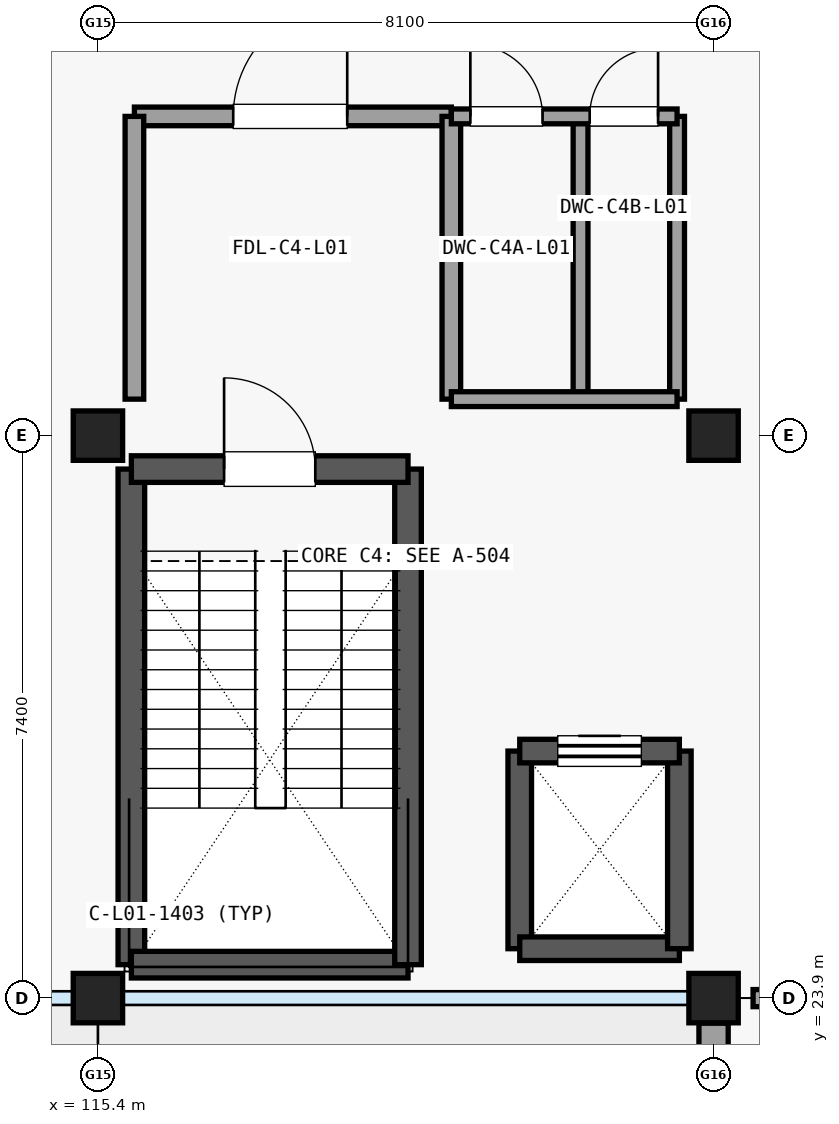
"""IFC4 building model, lengths in metres.
Left out: names, types, materials, properties, quantities, classifications, styles, units other than length and angle.
Written with IfcOpenShell. Run it as: python <this file> out.ifc"""

import sys

from ifc_helpers import new_model, si_unit, direction, frame, frame_2d, origin, origin_2d, place, context, subcontext, project, spatial, rectangle, extrude, element, fill, save


model = new_model("IFC4")
c1 = context("Model", 3, precision=1e-05, world=origin(), true_north=direction((0.0, 1.0)))
c2 = subcontext(c1, "Body", "Model", "MODEL_VIEW")
j1 = project(units=[si_unit("LENGTHUNIT", "METRE"), si_unit("PLANEANGLEUNIT", "RADIAN")], contexts=[c1])
p1 = place(None, origin())
s1 = spatial("IfcSite", under=j1, at=p1, CompositionType="ELEMENT")
p2 = place(p1, origin())
s2 = spatial("IfcBuilding", under=s1, at=p2, CompositionType="ELEMENT")
p3 = place(p2, frame((0.0, 0.0, 5.4)))
s3 = spatial("IfcBuildingStorey", under=s2, at=p3, CompositionType="ELEMENT", Elevation=5.4)
for number, where, z_axis, x_axis in (
    (1, (115.4, 23.9, 0.0), (0.0, 0.0, 1.0), (1.0, 0.0, 0.0)),
    (2, (115.4, 31.3, 0.0), (0.0, 0.0, 1.0), (1.0, 0.0, 0.0)),
    (3, (123.5, 23.9, 0.0), (0.0, 0.0, 1.0), (1.0, 0.0, 0.0)),
    (4, (123.5, 31.3, 0.0), (0.0, 0.0, 1.0), (1.0, 0.0, 0.0)),
):
    element("IfcColumn", number, at=place(p3, frame(where, z_axis=z_axis, x_axis=x_axis)), inside=s3, PredefinedType="COLUMN", context=c2, shape_type="SweptSolid", body=[
        extrude(rectangle(XDim=0.65, YDim=0.65, at=origin_2d()), origin(), (0.0, 0.0, 1.0), 4.56),
    ])
p4 = place(p3, frame((123.5, 16.829, 0.0), z_axis=(0.0, 0.0, 1.0), x_axis=(0.0, 1.0, 0.0)))
e5 = element("IfcWall", 5, at=p4, inside=s3, PredefinedType="SOLIDWALL", context=c2, shape_type="SweptSolid", body=[
    extrude(rectangle(XDim=6.742, YDim=0.385, at=frame_2d((3.371, 0.0))), origin(), (0.0, 0.0, 1.0), 3.795),
])
p5 = place(p4, frame((2.251, 0.0, 0.65)))
e6 = element("IfcOpeningElement", 6, at=p5, cuts=e5, PredefinedType="OPENING", context=c2, shape_type="SweptSolid", body=[
    extrude(rectangle(XDim=0.88, YDim=2.9, at=frame_2d((0.44, 1.45))), frame((0.0, 0.203, 0.0), z_axis=(0.0, -1.0, 0.0), x_axis=(1.0, 0.0, 0.0)), (0.0, 0.0, 1.0), 0.405),
])
p6 = place(p4, frame((3.611, 0.0, 0.65)))
e7 = element("IfcOpeningElement", 7, at=p6, cuts=e5, PredefinedType="OPENING", context=c2, shape_type="SweptSolid", body=[
    extrude(rectangle(XDim=0.88, YDim=2.9, at=frame_2d((0.44, 1.45))), frame((0.0, 0.203, 0.0), z_axis=(0.0, -1.0, 0.0), x_axis=(1.0, 0.0, 0.0)), (0.0, 0.0, 1.0), 0.405),
])
p7 = place(p3, frame((115.84, 24.34, 0.0), z_axis=(0.0, 0.0, 1.0), x_axis=(0.0, 1.0, 0.0)))
e8 = element("IfcWall", 8, at=p7, inside=s3, PredefinedType="SHEAR", context=c2, shape_type="SweptSolid", body=[
    extrude(rectangle(XDim=6.52, YDim=0.35, at=frame_2d((3.26, 0.0))), origin(), (0.0, 0.0, 1.0), 4.555),
])
p8 = place(p3, frame((115.84, 24.34, 0.0), z_axis=(0.0, 0.0, 1.0), x_axis=(1.0, 0.0, 0.0)))
e9 = element("IfcWall", 9, at=p8, inside=s3, PredefinedType="SHEAR", context=c2, shape_type="SweptSolid", body=[
    extrude(rectangle(XDim=3.64, YDim=0.35, at=frame_2d((1.82, 0.0))), origin(), (0.0, 0.0, 1.0), 4.555),
])
p9 = place(p3, frame((119.48, 24.34, 0.0), z_axis=(0.0, 0.0, 1.0), x_axis=(0.0, 1.0, 0.0)))
e10 = element("IfcWall", 10, at=p9, inside=s3, PredefinedType="SHEAR", context=c2, shape_type="SweptSolid", body=[
    extrude(rectangle(XDim=6.52, YDim=0.35, at=frame_2d((3.26, 0.0))), origin(), (0.0, 0.0, 1.0), 4.555),
])
p10 = place(p3, frame((115.84, 30.86, 0.0), z_axis=(0.0, 0.0, 1.0), x_axis=(1.0, 0.0, 0.0)))
e11 = element("IfcWall", 11, at=p10, inside=s3, PredefinedType="SHEAR", context=c2, shape_type="SweptSolid", body=[
    extrude(rectangle(XDim=3.64, YDim=0.35, at=frame_2d((1.82, 0.0))), origin(), (0.0, 0.0, 1.0), 4.555),
])
p11 = place(p10, frame((1.22, 0.0, 0.0)))
e12 = element("IfcOpeningElement", 12, at=p11, cuts=e11, PredefinedType="OPENING", context=c2, shape_type="SweptSolid", body=[
    extrude(rectangle(XDim=1.2, YDim=2.15, at=frame_2d((0.6, 1.075))), frame((0.0, 0.185, 0.0), z_axis=(0.0, -1.0, 0.0), x_axis=(1.0, 0.0, 0.0)), (0.0, 0.0, 1.0), 0.37),
])
p12 = place(p3, frame((120.95, 24.55, 0.0), z_axis=(0.0, 0.0, 1.0), x_axis=(0.0, 1.0, 0.0)))
e13 = element("IfcWall", 13, at=p12, inside=s3, PredefinedType="SHEAR", context=c2, shape_type="SweptSolid", body=[
    extrude(rectangle(XDim=2.6, YDim=0.31, at=frame_2d((1.3, 0.0))), origin(), (0.0, 0.0, 1.0), 4.555),
])
p13 = place(p3, frame((120.95, 24.55, 0.0), z_axis=(0.0, 0.0, 1.0), x_axis=(1.0, 0.0, 0.0)))
e14 = element("IfcWall", 14, at=p13, inside=s3, PredefinedType="SHEAR", context=c2, shape_type="SweptSolid", body=[
    extrude(rectangle(XDim=2.1, YDim=0.31, at=frame_2d((1.05, 0.0))), origin(), (0.0, 0.0, 1.0), 4.555),
])
p14 = place(p3, frame((123.05, 24.55, 0.0), z_axis=(0.0, 0.0, 1.0), x_axis=(0.0, 1.0, 0.0)))
e15 = element("IfcWall", 15, at=p14, inside=s3, PredefinedType="SHEAR", context=c2, shape_type="SweptSolid", body=[
    extrude(rectangle(XDim=2.6, YDim=0.31, at=frame_2d((1.3, 0.0))), origin(), (0.0, 0.0, 1.0), 4.555),
])
p15 = place(p3, frame((120.95, 27.15, 0.0), z_axis=(0.0, 0.0, 1.0), x_axis=(1.0, 0.0, 0.0)))
e16 = element("IfcWall", 16, at=p15, inside=s3, PredefinedType="SHEAR", context=c2, shape_type="SweptSolid", body=[
    extrude(rectangle(XDim=2.1, YDim=0.31, at=frame_2d((1.05, 0.0))), origin(), (0.0, 0.0, 1.0), 4.555),
])
p16 = place(p15, frame((0.5, 0.0, 0.0)))
e17 = element("IfcOpeningElement", 17, at=p16, cuts=e16, PredefinedType="OPENING", context=c2, shape_type="SweptSolid", body=[
    extrude(rectangle(XDim=1.1, YDim=2.15, at=frame_2d((0.55, 1.075))), frame((0.0, 0.165, 0.0), z_axis=(0.0, -1.0, 0.0), x_axis=(1.0, 0.0, 0.0)), (0.0, 0.0, 1.0), 0.33),
])
p17 = place(p3, frame((115.88, 35.5, 0.0), z_axis=(0.0, 0.0, 1.0), x_axis=(1.0, 0.0, 0.0)))
e18 = element("IfcWall", 18, at=p17, inside=s3, PredefinedType="PARTITIONING", context=c2, shape_type="SweptSolid", body=[
    extrude(rectangle(XDim=4.17, YDim=0.245, at=frame_2d((2.085, 0.0))), origin(), (0.0, 0.0, 1.0), 3.85),
])
p18 = place(p17, frame((1.3, 0.0, 0.0)))
e19 = element("IfcOpeningElement", 19, at=p18, cuts=e18, PredefinedType="OPENING", context=c2, shape_type="SweptSolid", body=[
    extrude(rectangle(XDim=1.5, YDim=2.15, at=frame_2d((0.75, 1.075))), frame((0.0, 0.133, 0.0), z_axis=(0.0, -1.0, 0.0), x_axis=(1.0, 0.0, 0.0)), (0.0, 0.0, 1.0), 0.265),
])
for number, where, z_axis, x_axis in (
    (20, (115.88, 31.78, 0.0), (0.0, 0.0, 1.0), (0.0, 1.0, 0.0)),
    (21, (120.05, 31.78, 0.0), (0.0, 0.0, 1.0), (0.0, 1.0, 0.0)),
):
    element("IfcWall", number, at=place(p3, frame(where, z_axis=z_axis, x_axis=x_axis)), inside=s3, PredefinedType="PARTITIONING", context=c2, shape_type="SweptSolid", body=[
        extrude(rectangle(XDim=3.72, YDim=0.245, at=frame_2d((1.86, 0.0))), origin(), (0.0, 0.0, 1.0), 3.8),
    ])
for number, where, z_axis, x_axis in (
    (22, (121.75, 31.78, 0.0), (0.0, 0.0, 1.0), (0.0, 1.0, 0.0)),
    (23, (123.02, 31.78, 0.0), (0.0, 0.0, 1.0), (0.0, 1.0, 0.0)),
):
    element("IfcWall", number, at=place(p3, frame(where, z_axis=z_axis, x_axis=x_axis)), inside=s3, PredefinedType="PARTITIONING", context=c2, shape_type="SweptSolid", body=[
        extrude(rectangle(XDim=3.72, YDim=0.195, at=frame_2d((1.86, 0.0))), origin(), (0.0, 0.0, 1.0), 3.8),
    ])
p19 = place(p3, frame((120.05, 31.78, 0.0), z_axis=(0.0, 0.0, 1.0), x_axis=(1.0, 0.0, 0.0)))
e24 = element("IfcWall", 24, at=p19, inside=s3, PredefinedType="PARTITIONING", context=c2, shape_type="SweptSolid", body=[
    extrude(rectangle(XDim=2.97, YDim=0.195, at=frame_2d((1.485, 0.0))), origin(), (0.0, 0.0, 1.0), 3.8),
])
p20 = place(p3, frame((120.05, 35.5, 0.0), z_axis=(0.0, 0.0, 1.0), x_axis=(1.0, 0.0, 0.0)))
e25 = element("IfcWall", 25, at=p20, inside=s3, PredefinedType="PARTITIONING", context=c2, shape_type="SweptSolid", body=[
    extrude(rectangle(XDim=2.97, YDim=0.195, at=frame_2d((1.485, 0.0))), origin(), (0.0, 0.0, 1.0), 3.85),
])
p21 = place(p20, frame((0.25, 0.0, 0.0)))
e26 = element("IfcOpeningElement", 26, at=p21, cuts=e25, PredefinedType="OPENING", context=c2, shape_type="SweptSolid", body=[
    extrude(rectangle(XDim=0.95, YDim=2.1, at=frame_2d((0.475, 1.05))), frame((0.0, 0.107, 0.0), z_axis=(0.0, -1.0, 0.0), x_axis=(1.0, 0.0, 0.0)), (0.0, 0.0, 1.0), 0.215),
])
p22 = place(p20, frame((1.82, 0.0, 0.0)))
e27 = element("IfcOpeningElement", 27, at=p22, cuts=e25, PredefinedType="OPENING", context=c2, shape_type="SweptSolid", body=[
    extrude(rectangle(XDim=0.9, YDim=2.1, at=frame_2d((0.45, 1.05))), frame((0.0, 0.107, 0.0), z_axis=(0.0, -1.0, 0.0), x_axis=(1.0, 0.0, 0.0)), (0.0, 0.0, 1.0), 0.215),
])
p23 = place(p3, frame((124.02, 23.9, 0.0), z_axis=(0.0, 0.0, 1.0), x_axis=(1.0, 0.0, 0.0)))
e28 = element("IfcWall", 28, at=p23, inside=s3, PredefinedType="PARTITIONING", context=c2, shape_type="SweptSolid", body=[
    extrude(rectangle(XDim=7.06, YDim=0.225, at=frame_2d((3.53, 0.0))), origin(), (0.0, 0.0, 1.0), 3.8),
])
p24 = place(p23, frame((2.63, 0.0, 0.0)))
e29 = element("IfcOpeningElement", 29, at=p24, cuts=e28, PredefinedType="OPENING", context=c2, shape_type="SweptSolid", body=[
    extrude(rectangle(XDim=1.8, YDim=2.4, at=frame_2d((0.9, 1.2))), frame((0.0, 0.123, 0.0), z_axis=(0.0, -1.0, 0.0), x_axis=(1.0, 0.0, 0.0)), (0.0, 0.0, 1.0), 0.245),
])
p25 = place(p11, origin())
e30 = element("IfcDoor", 30, at=p25, inside=s3, OperationType="SINGLE_SWING_LEFT", PredefinedType="DOOR", context=c2, shape_type="SweptSolid", body=[
    extrude(rectangle(XDim=1.2, YDim=2.15, at=frame_2d((0.6, 1.075))), frame((0.0, 0.025, 0.0), z_axis=(0.0, -1.0, 0.0), x_axis=(1.0, 0.0, 0.0)), (0.0, 0.0, 1.0), 0.05),
])
fill(e12, e30)
p26 = place(p16, origin())
e31 = element("IfcDoor", 31, at=p26, inside=s3, OperationType="SLIDING_TO_LEFT", PredefinedType="DOOR", context=c2, shape_type="SweptSolid", body=[
    extrude(rectangle(XDim=1.1, YDim=2.15, at=frame_2d((0.55, 1.075))), frame((0.0, 0.025, 0.0), z_axis=(0.0, -1.0, 0.0), x_axis=(1.0, 0.0, 0.0)), (0.0, 0.0, 1.0), 0.05),
])
fill(e17, e31)
p27 = place(p18, origin())
e32 = element("IfcDoor", 32, at=p27, inside=s3, OperationType="SINGLE_SWING_RIGHT", PredefinedType="DOOR", context=c2, shape_type="SweptSolid", body=[
    extrude(rectangle(XDim=1.5, YDim=2.15, at=frame_2d((0.75, 1.075))), frame((0.0, 0.025, 0.0), z_axis=(0.0, -1.0, 0.0), x_axis=(1.0, 0.0, 0.0)), (0.0, 0.0, 1.0), 0.05),
])
fill(e19, e32)
p28 = place(p21, origin())
e33 = element("IfcDoor", 33, at=p28, inside=s3, OperationType="SINGLE_SWING_LEFT", PredefinedType="DOOR", context=c2, shape_type="SweptSolid", body=[
    extrude(rectangle(XDim=0.95, YDim=2.1, at=frame_2d((0.475, 1.05))), frame((0.0, 0.025, 0.0), z_axis=(0.0, -1.0, 0.0), x_axis=(1.0, 0.0, 0.0)), (0.0, 0.0, 1.0), 0.05),
])
fill(e26, e33)
p29 = place(p22, origin())
e34 = element("IfcDoor", 34, at=p29, inside=s3, OperationType="SINGLE_SWING_RIGHT", PredefinedType="DOOR", context=c2, shape_type="SweptSolid", body=[
    extrude(rectangle(XDim=0.9, YDim=2.1, at=frame_2d((0.45, 1.05))), frame((0.0, 0.025, 0.0), z_axis=(0.0, -1.0, 0.0), x_axis=(1.0, 0.0, 0.0)), (0.0, 0.0, 1.0), 0.05),
])
fill(e27, e34)
save(model, sys.argv[1])
